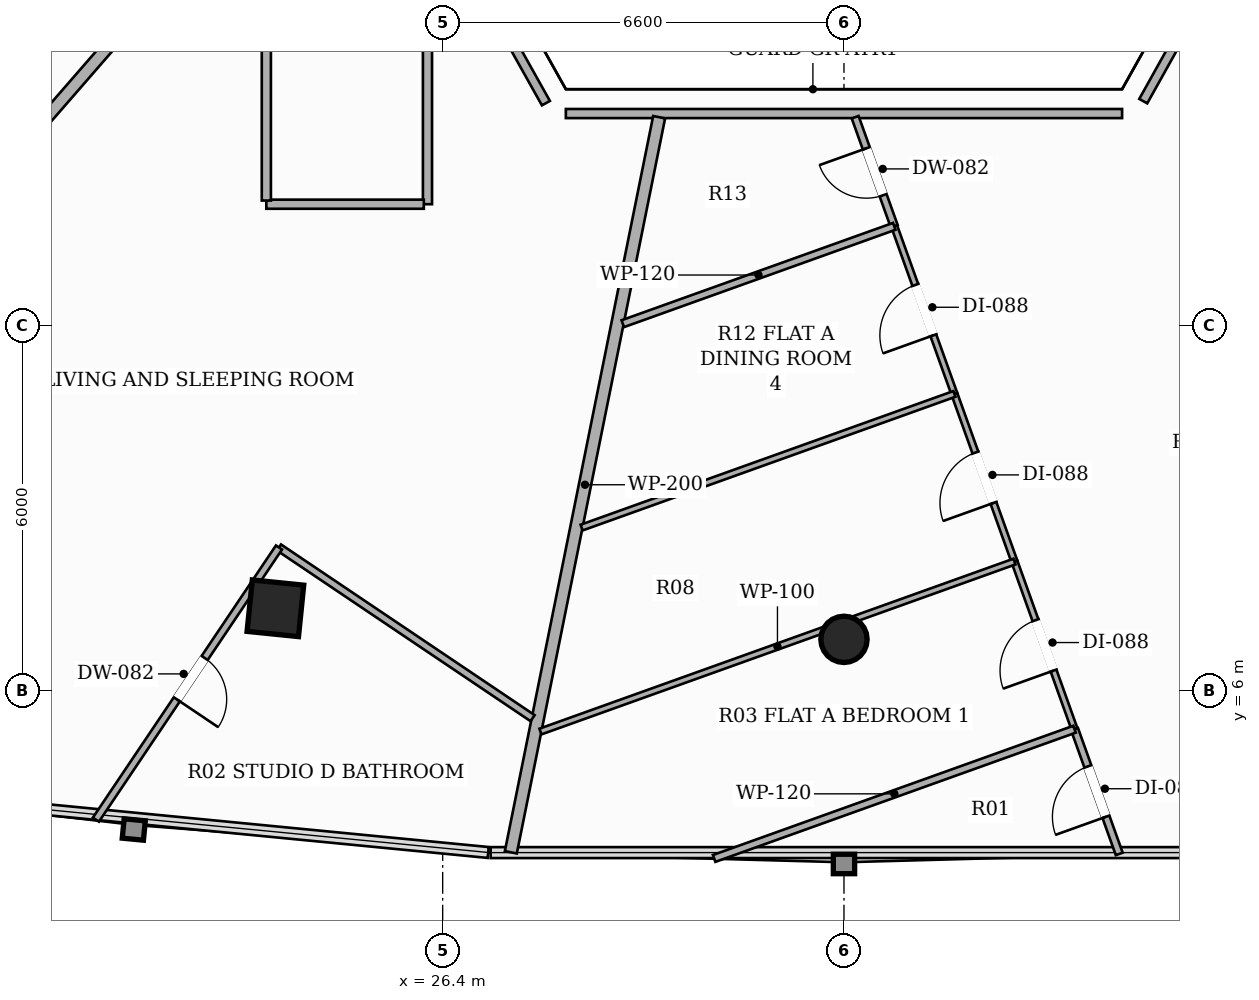
"""IFC4 building model, lengths in metres.
Left out: names, types, materials, properties, quantities, classifications, styles, units other than length and angle.
Written with IfcOpenShell. Run it as: python <this file> out.ifc"""

import sys

from ifc_helpers import new_model, si_unit, direction, frame, frame_2d, origin, origin_2d, place, context, subcontext, project, spatial, rectangle, hollow_rectangle, hollow_circle, extrude, element, fill, save


model = new_model("IFC4")
c1 = context("Model", 3, precision=1e-05, world=origin(), true_north=direction((0.0, 1.0)))
c2 = subcontext(c1, "Body", "Model", "MODEL_VIEW")
j1 = project(units=[si_unit("LENGTHUNIT", "METRE"), si_unit("PLANEANGLEUNIT", "RADIAN")], contexts=[c1])
p1 = place(None, origin())
s1 = spatial("IfcSite", under=j1, at=p1, CompositionType="ELEMENT")
p2 = place(p1, origin())
s2 = spatial("IfcBuilding", under=s1, at=p2, CompositionType="ELEMENT")
p3 = place(p2, frame((0.0, 0.0, 139.7)))
s3 = spatial("IfcBuildingStorey", under=s2, at=p3, CompositionType="ELEMENT", Elevation=139.7)
p4 = place(p3, frame((23.649, 7.355, 0.0), z_axis=(0.0, 0.0, 1.0), x_axis=(-0.994880708829, 0.101056297183, 0.0)))
e1 = element("IfcColumn", 1, at=p4, inside=s3, PredefinedType="COLUMN", context=c2, shape_type="SweptSolid", body=[
    extrude(hollow_rectangle(XDim=0.85, YDim=0.85, WallThickness=0.028, at=origin_2d()), origin(), (0.0, 0.0, 1.0), 3.3),
])
p5 = place(p3, frame((33.0, 6.844, 0.0), z_axis=(0.0, 0.0, 1.0), x_axis=(1.0, 0.0, 0.0)))
e2 = element("IfcColumn", 2, at=p5, inside=s3, PredefinedType="COLUMN", context=c2, shape_type="SweptSolid", body=[
    extrude(hollow_circle(Radius=0.381, WallThickness=0.022, at=origin_2d()), origin(), (0.0, 0.0, 1.0), 3.3),
])
p6 = place(p3, frame((26.15, 23.79, 0.0), z_axis=(0.0, 0.0, 1.0), x_axis=(0.0, -1.0, 0.0)))
e3 = element("IfcWall", 3, at=p6, inside=s3, PredefinedType="PARTITIONING", context=c2, shape_type="SweptSolid", body=[
    extrude(rectangle(XDim=9.79, YDim=0.15, at=frame_2d((4.895, 0.0))), origin(), (0.0, 0.0, 1.0), 2.721),
])
p7 = place(p6, frame((4.809, 0.0, 0.0)))
e4 = element("IfcOpeningElement", 4, at=p7, cuts=e3, PredefinedType="OPENING", context=c2, shape_type="SweptSolid", body=[
    extrude(rectangle(XDim=0.92, YDim=2.15, at=frame_2d((0.46, 1.075))), frame((0.0, 0.085, 0.0), z_axis=(0.0, -1.0, 0.0), x_axis=(1.0, 0.0, 0.0)), (0.0, 0.0, 1.0), 0.17),
])
p8 = place(p3, frame((26.09, 14.0, 0.0), z_axis=(0.0, 0.0, 1.0), x_axis=(-1.0, 0.0, 0.0)))
e5 = element("IfcWall", 5, at=p8, inside=s3, PredefinedType="PARTITIONING", context=c2, shape_type="SweptSolid", body=[
    extrude(rectangle(XDim=2.59, YDim=0.15, at=frame_2d((1.295, 0.0))), origin(), (0.0, 0.0, 1.0), 2.721),
])
p9 = place(p3, frame((23.5, 14.06, 0.0), z_axis=(0.0, 0.0, 1.0), x_axis=(0.0, 1.0, 0.0)))
e6 = element("IfcWall", 6, at=p9, inside=s3, PredefinedType="PARTITIONING", context=c2, shape_type="SweptSolid", body=[
    extrude(rectangle(XDim=22.84, YDim=0.15, at=frame_2d((11.42, 0.0))), origin(), (0.0, 0.0, 1.0), 2.413),
])
p10 = place(p9, frame((13.533, 0.0, 0.0)))
e7 = element("IfcOpeningElement", 7, at=p10, cuts=e6, PredefinedType="OPENING", context=c2, shape_type="SweptSolid", body=[
    extrude(rectangle(XDim=0.88, YDim=2.1, at=frame_2d((0.44, 1.05))), frame((0.0, 0.085, 0.0), z_axis=(0.0, -1.0, 0.0), x_axis=(1.0, 0.0, 0.0)), (0.0, 0.0, 1.0), 0.17),
])
p11 = place(p3, frame((38.408, 16.565, 0.0), z_axis=(0.0, 0.0, 1.0), x_axis=(-0.48761814532, -0.873057010942, 0.0)))
e8 = element("IfcWall", 8, at=p11, inside=s3, PredefinedType="PARTITIONING", context=c2, shape_type="SweptSolid", body=[
    extrude(rectangle(XDim=0.996, YDim=0.15, at=frame_2d((0.498, 0.0))), origin(), (0.0, 0.0, 1.0), 3.06),
])
p12 = place(p3, frame((37.574, 15.491, 0.0), z_axis=(0.0, 0.0, 1.0), x_axis=(-1.0, 0.0, 0.0)))
e9 = element("IfcWall", 9, at=p12, inside=s3, PredefinedType="PARTITIONING", context=c2, shape_type="SweptSolid", body=[
    extrude(rectangle(XDim=9.148, YDim=0.15, at=frame_2d((4.574, 0.0))), origin(), (0.0, 0.0, 1.0), 2.721),
])
p13 = place(p3, frame((28.098, 15.662, 0.0), z_axis=(0.0, 0.0, 1.0), x_axis=(-0.488804496818, 0.872393353878, 0.0)))
e10 = element("IfcWall", 10, at=p13, inside=s3, PredefinedType="PARTITIONING", context=c2, shape_type="SweptSolid", body=[
    extrude(rectangle(XDim=1.035, YDim=0.15, at=frame_2d((0.518, 0.0))), origin(), (0.0, 0.0, 1.0), 3.06),
])
p14 = place(p3, frame((27.521, 3.342, 0.0), z_axis=(0.0, 0.0, 1.0), x_axis=(0.197768112081, 0.980248832615, 0.0)))
e11 = element("IfcWall", 11, at=p14, inside=s3, PredefinedType="PARTITIONING", context=c2, shape_type="SweptSolid", body=[
    extrude(rectangle(XDim=12.333, YDim=0.2, at=frame_2d((6.166, 0.0))), origin(), (0.0, 0.0, 1.0), 2.413),
])
p15 = place(p3, frame((38.101, 23.79, 0.0), z_axis=(0.0, 0.0, 1.0), x_axis=(0.605201904092, -0.796072016393, 0.0)))
e12 = element("IfcWall", 12, at=p15, inside=s3, PredefinedType="PARTITIONING", context=c2, shape_type="SweptSolid", body=[
    extrude(rectangle(XDim=23.896, YDim=0.2, at=frame_2d((11.948, 0.0))), origin(), (0.0, 0.0, 1.0), 2.413),
])
p16 = place(p3, frame((23.44, 19.512, 0.0), z_axis=(0.0, 0.0, 1.0), x_axis=(-0.656359216658, -0.754448526215, 0.0)))
e13 = element("IfcWall", 13, at=p16, inside=s3, PredefinedType="PARTITIONING", context=c2, shape_type="SweptSolid", body=[
    extrude(rectangle(XDim=19.085, YDim=0.2, at=frame_2d((9.543, 0.0))), origin(), (0.0, 0.0, 1.0), 2.413),
])
p17 = place(p3, frame((33.827, 13.636, 0.0), z_axis=(0.0, 0.0, 1.0), x_axis=(-0.337163686904, 0.941446041063, 0.0)))
e14 = element("IfcWall", 14, at=p17, inside=s3, PredefinedType="PARTITIONING", context=c2, shape_type="SweptSolid", body=[
    extrude(rectangle(XDim=1.906, YDim=0.12, at=frame_2d((0.953, 0.0))), origin(), (0.0, 0.0, 1.0), 2.721),
])
p18 = place(p17, frame((0.543, 0.0, 0.0)))
e15 = element("IfcOpeningElement", 15, at=p18, cuts=e14, PredefinedType="OPENING", context=c2, shape_type="SweptSolid", body=[
    extrude(rectangle(XDim=0.82, YDim=2.1, at=frame_2d((0.41, 1.05))), frame((0.0, 0.07, 0.0), z_axis=(0.0, -1.0, 0.0), x_axis=(1.0, 0.0, 0.0)), (0.0, 0.0, 1.0), 0.14),
])
p19 = place(p3, frame((37.527, 3.315, 0.0), z_axis=(0.0, 0.0, 1.0), x_axis=(-0.337393850622, 0.9413635799, 0.0)))
e16 = element("IfcWall", 16, at=p19, inside=s3, PredefinedType="PARTITIONING", context=c2, shape_type="SweptSolid", body=[
    extrude(rectangle(XDim=2.179, YDim=0.12, at=frame_2d((1.089, 0.0))), origin(), (0.0, 0.0, 1.0), 3.06),
])
p20 = place(p19, frame((0.649, 0.0, 0.0)))
e17 = element("IfcOpeningElement", 17, at=p20, cuts=e16, PredefinedType="OPENING", context=c2, shape_type="SweptSolid", body=[
    extrude(rectangle(XDim=0.88, YDim=2.1, at=frame_2d((0.44, 1.05))), frame((0.0, 0.07, 0.0), z_axis=(0.0, -1.0, 0.0), x_axis=(1.0, 0.0, 0.0)), (0.0, 0.0, 1.0), 0.14),
])
p21 = place(p3, frame((36.792, 5.366, 0.0), z_axis=(0.0, 0.0, 1.0), x_axis=(-0.33735537207, 0.941377370099, 0.0)))
e18 = element("IfcWall", 18, at=p21, inside=s3, PredefinedType="PARTITIONING", context=c2, shape_type="SweptSolid", body=[
    extrude(rectangle(XDim=2.929, YDim=0.1, at=frame_2d((1.464, 0.0))), origin(), (0.0, 0.0, 1.0), 2.413),
])
p22 = place(p21, frame((1.024, 0.0, 0.0)))
e19 = element("IfcOpeningElement", 19, at=p22, cuts=e18, PredefinedType="OPENING", context=c2, shape_type="SweptSolid", body=[
    extrude(rectangle(XDim=0.88, YDim=2.1, at=frame_2d((0.44, 1.05))), frame((0.0, 0.06, 0.0), z_axis=(0.0, -1.0, 0.0), x_axis=(1.0, 0.0, 0.0)), (0.0, 0.0, 1.0), 0.12),
])
p23 = place(p3, frame((35.804, 8.123, 0.0), z_axis=(0.0, 0.0, 1.0), x_axis=(-0.337381847176, 0.941367881965, 0.0)))
e20 = element("IfcWall", 20, at=p23, inside=s3, PredefinedType="PARTITIONING", context=c2, shape_type="SweptSolid", body=[
    extrude(rectangle(XDim=2.928, YDim=0.1, at=frame_2d((1.464, 0.0))), origin(), (0.0, 0.0, 1.0), 3.06),
])
p24 = place(p23, frame((1.024, 0.0, 0.0)))
e21 = element("IfcOpeningElement", 21, at=p24, cuts=e20, PredefinedType="OPENING", context=c2, shape_type="SweptSolid", body=[
    extrude(rectangle(XDim=0.88, YDim=2.1, at=frame_2d((0.44, 1.05))), frame((0.0, 0.06, 0.0), z_axis=(0.0, -1.0, 0.0), x_axis=(1.0, 0.0, 0.0)), (0.0, 0.0, 1.0), 0.12),
])
p25 = place(p3, frame((34.816, 10.88, 0.0), z_axis=(0.0, 0.0, 1.0), x_axis=(-0.337756804272, 0.941233414817, 0.0)))
e22 = element("IfcWall", 22, at=p25, inside=s3, PredefinedType="PARTITIONING", context=c2, shape_type="SweptSolid", body=[
    extrude(rectangle(XDim=2.928, YDim=0.1, at=frame_2d((1.464, 0.0))), origin(), (0.0, 0.0, 1.0), 3.06),
])
p26 = place(p25, frame((1.024, 0.0, 0.0)))
e23 = element("IfcOpeningElement", 23, at=p26, cuts=e22, PredefinedType="OPENING", context=c2, shape_type="SweptSolid", body=[
    extrude(rectangle(XDim=0.88, YDim=2.1, at=frame_2d((0.44, 1.05))), frame((0.0, 0.06, 0.0), z_axis=(0.0, -1.0, 0.0), x_axis=(1.0, 0.0, 0.0)), (0.0, 0.0, 1.0), 0.12),
])
p27 = place(p3, frame((33.827, 13.636, 0.0), z_axis=(0.0, 0.0, 1.0), x_axis=(-0.941307932725, -0.337549071676, 0.0)))
e24 = element("IfcWall", 24, at=p27, inside=s3, PredefinedType="PARTITIONING", context=c2, shape_type="SweptSolid", body=[
    extrude(rectangle(XDim=4.743, YDim=0.12, at=frame_2d((2.372, 0.0))), origin(), (0.0, 0.0, 1.0), 2.721),
])
p28 = place(p3, frame((30.865, 3.241, 0.0), z_axis=(0.0, 0.0, 1.0), x_axis=(0.941328015911, 0.337493061354, 0.0)))
e25 = element("IfcWall", 25, at=p28, inside=s3, PredefinedType="PARTITIONING", context=c2, shape_type="SweptSolid", body=[
    extrude(rectangle(XDim=6.296, YDim=0.12, at=frame_2d((3.148, 0.0))), origin(), (0.0, 0.0, 1.0), 2.619),
])
p29 = place(p3, frame((28.008, 5.328, 0.0), z_axis=(0.0, 0.0, 1.0), x_axis=(0.941323677897, 0.337505160599, 0.0)))
e26 = element("IfcWall", 26, at=p29, inside=s3, PredefinedType="PARTITIONING", context=c2, shape_type="SweptSolid", body=[
    extrude(rectangle(XDim=8.282, YDim=0.1, at=frame_2d((4.141, 0.0))), origin(), (0.0, 0.0, 1.0), 2.413),
])
p30 = place(p3, frame((28.685, 8.682, 0.0), z_axis=(0.0, 0.0, 1.0), x_axis=(0.94133243901, 0.337480724291, 0.0)))
e27 = element("IfcWall", 27, at=p30, inside=s3, PredefinedType="PARTITIONING", context=c2, shape_type="SweptSolid", body=[
    extrude(rectangle(XDim=6.513, YDim=0.1, at=frame_2d((3.256, 0.0))), origin(), (0.0, 0.0, 1.0), 2.721),
])
p31 = place(p3, frame((27.879, 5.548, 0.0), z_axis=(0.0, 0.0, 1.0), x_axis=(-0.829629274352, 0.558314666777, 0.0)))
e28 = element("IfcWall", 28, at=p31, inside=s3, PredefinedType="PARTITIONING", context=c2, shape_type="SweptSolid", body=[
    extrude(rectangle(XDim=5.027, YDim=0.12, at=frame_2d((2.514, 0.0))), origin(), (0.0, 0.0, 1.0), 2.413),
])
p32 = place(p3, frame((23.708, 8.355, 0.0), z_axis=(0.0, 0.0, 1.0), x_axis=(-0.55815233332, -0.829738496642, 0.0)))
e29 = element("IfcWall", 29, at=p32, inside=s3, PredefinedType="PARTITIONING", context=c2, shape_type="SweptSolid", body=[
    extrude(rectangle(XDim=5.395, YDim=0.12, at=frame_2d((2.697, 0.0))), origin(), (0.0, 0.0, 1.0), 2.413),
])
p33 = place(p32, frame((2.19, 0.0, 0.0)))
e30 = element("IfcOpeningElement", 30, at=p33, cuts=e29, PredefinedType="OPENING", context=c2, shape_type="SweptSolid", body=[
    extrude(rectangle(XDim=0.82, YDim=2.1, at=frame_2d((0.41, 1.05))), frame((0.0, 0.07, 0.0), z_axis=(0.0, -1.0, 0.0), x_axis=(1.0, 0.0, 0.0)), (0.0, 0.0, 1.0), 0.14),
])
p34 = place(p18, origin())
e31 = element("IfcDoor", 31, at=p34, inside=s3, OperationType="SINGLE_SWING_RIGHT", PredefinedType="DOOR", context=c2, shape_type="SweptSolid", body=[
    extrude(rectangle(XDim=0.82, YDim=2.1, at=frame_2d((0.41, 1.05))), frame((0.0, 0.025, 0.0), z_axis=(0.0, -1.0, 0.0), x_axis=(1.0, 0.0, 0.0)), (0.0, 0.0, 1.0), 0.05),
])
fill(e15, e31)
p35 = place(p20, origin())
e32 = element("IfcDoor", 32, at=p35, inside=s3, OperationType="SINGLE_SWING_LEFT", PredefinedType="DOOR", context=c2, shape_type="SweptSolid", body=[
    extrude(rectangle(XDim=0.88, YDim=2.1, at=frame_2d((0.44, 1.05))), frame((0.0, 0.025, 0.0), z_axis=(0.0, -1.0, 0.0), x_axis=(1.0, 0.0, 0.0)), (0.0, 0.0, 1.0), 0.05),
])
fill(e17, e32)
p36 = place(p22, origin())
e33 = element("IfcDoor", 33, at=p36, inside=s3, OperationType="SINGLE_SWING_LEFT", PredefinedType="DOOR", context=c2, shape_type="SweptSolid", body=[
    extrude(rectangle(XDim=0.88, YDim=2.1, at=frame_2d((0.44, 1.05))), frame((0.0, 0.025, 0.0), z_axis=(0.0, -1.0, 0.0), x_axis=(1.0, 0.0, 0.0)), (0.0, 0.0, 1.0), 0.05),
])
fill(e19, e33)
p37 = place(p24, origin())
e34 = element("IfcDoor", 34, at=p37, inside=s3, OperationType="SINGLE_SWING_LEFT", PredefinedType="DOOR", context=c2, shape_type="SweptSolid", body=[
    extrude(rectangle(XDim=0.88, YDim=2.1, at=frame_2d((0.44, 1.05))), frame((0.0, 0.025, 0.0), z_axis=(0.0, -1.0, 0.0), x_axis=(1.0, 0.0, 0.0)), (0.0, 0.0, 1.0), 0.05),
])
fill(e21, e34)
p38 = place(p26, origin())
e35 = element("IfcDoor", 35, at=p38, inside=s3, OperationType="SINGLE_SWING_LEFT", PredefinedType="DOOR", context=c2, shape_type="SweptSolid", body=[
    extrude(rectangle(XDim=0.88, YDim=2.1, at=frame_2d((0.44, 1.05))), frame((0.0, 0.025, 0.0), z_axis=(0.0, -1.0, 0.0), x_axis=(1.0, 0.0, 0.0)), (0.0, 0.0, 1.0), 0.05),
])
fill(e23, e35)
p39 = place(p33, origin())
e36 = element("IfcDoor", 36, at=p39, inside=s3, OperationType="SINGLE_SWING_RIGHT", PredefinedType="DOOR", context=c2, shape_type="SweptSolid", body=[
    extrude(rectangle(XDim=0.82, YDim=2.1, at=frame_2d((0.41, 1.05))), frame((0.0, 0.025, 0.0), z_axis=(0.0, -1.0, 0.0), x_axis=(1.0, 0.0, 0.0)), (0.0, 0.0, 1.0), 0.05),
])
fill(e30, e36)
save(model, sys.argv[1])
